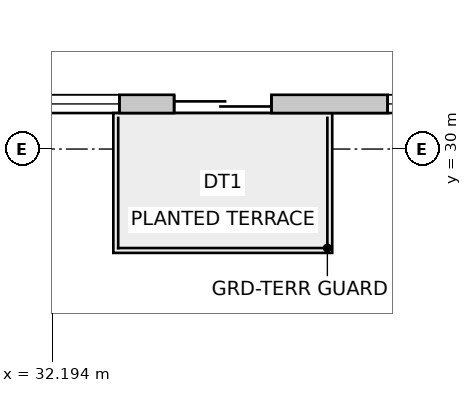
"""IFC4 building model, lengths in metres.
Left out: names, types, materials, properties, quantities, classifications, styles, units other than length and angle.
Written with IfcOpenShell. Run it as: python <this file> out.ifc"""

import sys

from ifc_helpers import new_model, si_unit, direction, frame, frame_2d, origin, place, context, subcontext, project, spatial, rectangle, extrude, source, transform, mapped, element, fill, save


model = new_model("IFC4")
c1 = context("Model", 3, precision=1e-05, world=origin(), true_north=direction((0.0, 1.0)))
c2 = subcontext(c1, "Body", "Model", "MODEL_VIEW")
j1 = project(units=[si_unit("LENGTHUNIT", "METRE"), si_unit("PLANEANGLEUNIT", "RADIAN")], contexts=[c1])
p1 = place(None, origin())
s1 = spatial("IfcSite", under=j1, at=p1, CompositionType="ELEMENT")
p2 = place(p1, origin())
s2 = spatial("IfcBuilding", under=s1, at=p2, CompositionType="ELEMENT")
p3 = place(p2, frame((0.0, 0.0, 143.0)))
s3 = spatial("IfcBuildingStorey", under=s2, at=p3, CompositionType="ELEMENT", Elevation=143.0)
p4 = place(p3, frame((30.261, 30.742, 0.0), z_axis=(0.0, 0.0, 1.0), x_axis=(1.0, 0.0, 0.0)))
e1 = element("IfcWall", 1, at=p4, inside=s3, PredefinedType="SOLIDWALL", context=c2, shape_type="SweptSolid", body=[
    extrude(rectangle(XDim=22.227, YDim=0.3, at=frame_2d((11.113, 0.0))), origin(), (0.0, 0.0, 1.0), 3.35),
])
m1 = source(origin(), c2, "Body", "SweptSolid", [
    extrude(rectangle(XDim=1.6, YDim=2.15, at=frame_2d((0.8, 1.075))), frame((0.0, 0.16, 0.0), z_axis=(0.0, -1.0, 0.0), x_axis=(1.0, 0.0, 0.0)), (0.0, 0.0, 1.0), 0.32),
])
p5 = place(p4, frame((3.939, 0.0, 0.0)))
e2 = element("IfcOpeningElement", 2, at=p5, cuts=e1, PredefinedType="OPENING", context=c2, shape_type="MappedRepresentation", body=[
    mapped(m1, transform((0.0, 0.0, 0.0), scale=1.0)),
])
m2 = source(origin(), c2, "Body", "SweptSolid", [
    extrude(rectangle(XDim=2.1, YDim=2.0, at=frame_2d((1.05, 1.0))), frame((0.0, 0.16, 0.0), z_axis=(0.0, -1.0, 0.0), x_axis=(1.0, 0.0, 0.0)), (0.0, 0.0, 1.0), 0.32),
])
p6 = place(p4, frame((0.939, 0.0, 0.85)))
e3 = element("IfcOpeningElement", 3, at=p6, cuts=e1, PredefinedType="OPENING", context=c2, shape_type="MappedRepresentation", body=[
    mapped(m2, transform((0.0, 0.0, 0.0), scale=1.0)),
])
p7 = place(p4, frame((7.45, 0.0, 0.85)))
e4 = element("IfcOpeningElement", 4, at=p7, cuts=e1, PredefinedType="OPENING", context=c2, shape_type="MappedRepresentation", body=[
    mapped(m2, transform((0.0, 0.0, 0.0), scale=1.0)),
])
m3 = source(origin(), c2, "Body", "SweptSolid", [
    extrude(rectangle(XDim=2.4, YDim=2.2, at=frame_2d((1.2, 1.1))), frame((0.0, 0.16, 0.0), z_axis=(0.0, -1.0, 0.0), x_axis=(1.0, 0.0, 0.0)), (0.0, 0.0, 1.0), 0.32),
])
p8 = place(p4, frame((12.663, 0.0, 0.85)))
e5 = element("IfcOpeningElement", 5, at=p8, cuts=e1, PredefinedType="OPENING", context=c2, shape_type="MappedRepresentation", body=[
    mapped(m3, transform((0.0, 0.0, 0.0), scale=1.0)),
])
p9 = place(p4, frame((18.176, 0.0, 0.85)))
e6 = element("IfcOpeningElement", 6, at=p9, cuts=e1, PredefinedType="OPENING", context=c2, shape_type="MappedRepresentation", body=[
    mapped(m2, transform((0.0, 0.0, 0.0), scale=1.0)),
])
m4 = source(origin(), c2, "Body", "SweptSolid", [
    extrude(rectangle(XDim=1.6, YDim=2.15, at=frame_2d((0.8, 1.075))), frame((0.0, 0.025, 0.0), z_axis=(0.0, -1.0, 0.0), x_axis=(1.0, 0.0, 0.0)), (0.0, 0.0, 1.0), 0.05),
])
p10 = place(p5, origin())
e7 = element("IfcDoor", 7, at=p10, inside=s3, OperationType="DOUBLE_DOOR_SLIDING", PredefinedType="DOOR", context=c2, shape_type="MappedRepresentation", body=[
    mapped(m4, transform((0.0, 0.0, 0.0), scale=1.0)),
])
fill(e2, e7)
m5 = source(origin(), c2, "Body", "SweptSolid", [
    extrude(rectangle(XDim=2.1, YDim=2.0, at=frame_2d((1.05, 1.0))), frame((0.0, -0.015, 0.0), z_axis=(0.0, -1.0, 0.0), x_axis=(1.0, 0.0, 0.0)), (0.0, 0.0, 1.0), 0.06),
])
p11 = place(p6, origin())
e8 = element("IfcWindow", 8, at=p11, inside=s3, PartitioningType="SINGLE_PANEL", PredefinedType="WINDOW", context=c2, shape_type="MappedRepresentation", body=[
    mapped(m5, transform((0.0, 0.0, 0.0), scale=1.0)),
])
fill(e3, e8)
p12 = place(p7, origin())
e9 = element("IfcWindow", 9, at=p12, inside=s3, PartitioningType="SINGLE_PANEL", PredefinedType="WINDOW", context=c2, shape_type="MappedRepresentation", body=[
    mapped(m5, transform((0.0, 0.0, 0.0), scale=1.0)),
])
fill(e4, e9)
save(model, sys.argv[1])
